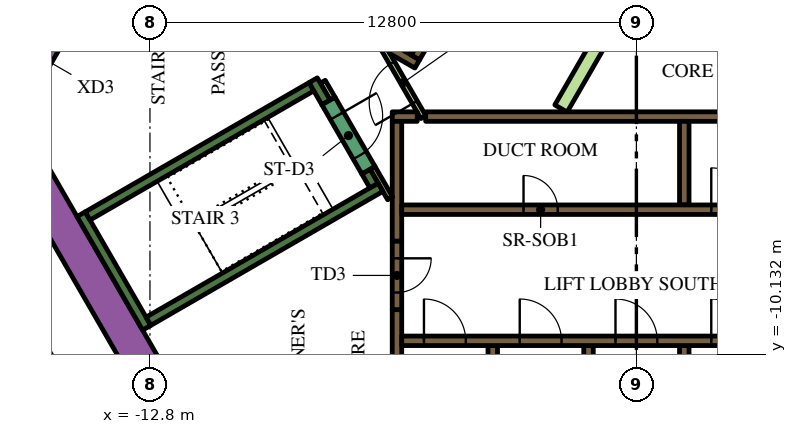
"""IFC4 building model, lengths in metres.
Left out: names, types, materials, properties, quantities, classifications, styles, units other than length and angle.
Written with IfcOpenShell. Run it as: python <this file> out.ifc"""

import sys

from ifc_helpers import new_model, si_unit, direction, frame, frame_2d, origin, place, context, subcontext, project, spatial, polyline, rectangle, outline, extrude, element, fill, save


model = new_model("IFC4")
c1 = context("Model", 3, precision=1e-05, world=origin(), true_north=direction((0.0, 1.0)))
c2 = subcontext(c1, "Body", "Model", "MODEL_VIEW")
j1 = project(units=[si_unit("LENGTHUNIT", "METRE"), si_unit("PLANEANGLEUNIT", "RADIAN")], contexts=[c1])
p1 = place(None, origin())
s1 = spatial("IfcSite", under=j1, at=p1, CompositionType="ELEMENT")
p2 = place(p1, origin())
s2 = spatial("IfcBuilding", under=s1, at=p2, CompositionType="ELEMENT")
p3 = place(p2, frame((0.0, 0.0, 39.3)))
s3 = spatial("IfcBuildingStorey", under=s2, at=p3, CompositionType="ELEMENT", Elevation=39.3)
p4 = place(p3, frame((-12.134, -11.883, 0.0), z_axis=(0.0, 0.0, 1.0), x_axis=(-0.500005339912, 0.866022320763, 0.0)))
e1 = element("IfcWall", 1, at=p4, inside=s3, PredefinedType="SOLIDWALL", context=c2, shape_type="SweptSolid", body=[
    extrude(rectangle(XDim=9.488, YDim=0.9, at=frame_2d((4.744, 0.0))), origin(), (0.0, 0.0, 1.0), 3.9),
])
p5 = place(p3, frame((-12.885, -9.431, 0.0), z_axis=(0.0, 0.0, 1.0), x_axis=(-0.500020560727, 0.866013532718, 0.0)))
e2 = element("IfcWall", 2, at=p5, inside=s3, PredefinedType="SOLIDWALL", context=c2, shape_type="SweptSolid", body=[
    extrude(rectangle(XDim=3.45, YDim=0.25, at=frame_2d((1.725, 0.0))), origin(), (0.0, 0.0, 1.0), 3.9),
])
p6 = place(p3, frame((-14.44, -6.49, 0.0), z_axis=(0.0, 0.0, 1.0), x_axis=(0.866022966069, 0.500004222222, 0.0)))
e3 = element("IfcWall", 3, at=p6, inside=s3, PredefinedType="SOLIDWALL", context=c2, shape_type="SweptSolid", body=[
    extrude(rectangle(XDim=6.8, YDim=0.25, at=frame_2d((3.4, 0.0))), origin(), (0.0, 0.0, 1.0), 3.9),
])
p7 = place(p3, frame((-8.168, -3.503, 0.0), z_axis=(0.0, 0.0, 1.0), x_axis=(-0.499952099219, 0.866053057547, 0.0)))
e4 = element("IfcWall", 4, at=p7, inside=s3, PredefinedType="SOLIDWALL", context=c2, shape_type="SweptSolid", body=[
    extrude(rectangle(XDim=0.675, YDim=0.25, at=frame_2d((0.337, 0.0))), origin(), (0.0, 0.0, 1.0), 3.9),
])
p8 = place(p3, frame((-12.84, -9.261, 0.0), z_axis=(0.0, 0.0, 1.0), x_axis=(0.866016039709, 0.500016218704, 0.0)))
e5 = element("IfcWall", 5, at=p8, inside=s3, PredefinedType="SOLIDWALL", context=c2, shape_type="SweptSolid", body=[
    extrude(rectangle(XDim=7.05, YDim=0.25, at=frame_2d((3.525, 0.0))), origin(), (0.0, 0.0, 1.0), 3.9),
])
p9 = place(p3, frame((-6.905, -5.69, 0.0), z_axis=(0.0, 0.0, 1.0), x_axis=(-0.500402024738, 0.865793170242, 0.0)))
e6 = element("IfcWall", 6, at=p9, inside=s3, PredefinedType="SOLIDWALL", context=c2, shape_type="SweptSolid", body=[
    extrude(rectangle(XDim=0.425, YDim=0.25, at=frame_2d((0.212, 0.0))), origin(), (0.0, 0.0, 1.0), 3.9),
])
p10 = place(p3, frame((-3.78, -12.1, 0.0), z_axis=(0.0, 0.0, 1.0), x_axis=(0.0, 1.0, 0.0)))
e7 = element("IfcWall", 7, at=p10, inside=s3, PredefinedType="SOLIDWALL", context=c2, shape_type="SweptSolid", body=[
    extrude(rectangle(XDim=2.2, YDim=0.25, at=frame_2d((1.1, 0.0))), origin(), (0.0, 0.0, 1.0), 3.9),
])
p11 = place(p3, frame((-6.3, -12.1, 0.0), z_axis=(0.0, 0.0, 1.0), x_axis=(0.0, 1.0, 0.0)))
e8 = element("IfcWall", 8, at=p11, inside=s3, PredefinedType="SOLIDWALL", context=c2, shape_type="SweptSolid", body=[
    extrude(rectangle(XDim=3.146, YDim=0.25, at=frame_2d((1.573, 0.0))), origin(), (0.0, 0.0, 1.0), 3.9),
])
p12 = place(p3, frame((-5.545, -3.875, 0.0), z_axis=(0.0, 0.0, 1.0), x_axis=(1.0, 0.0, 0.0)))
e9 = element("IfcWall", 9, at=p12, inside=s3, PredefinedType="SOLIDWALL", context=c2, shape_type="SweptSolid", body=[
    extrude(rectangle(XDim=11.97, YDim=0.25, at=frame_2d((5.985, 0.0))), origin(), (0.0, 0.0, 1.0), 3.9),
])
p13 = place(p3, frame((-6.425, -3.875, 0.0), z_axis=(0.0, 0.0, 1.0), x_axis=(1.0, 0.0, 0.0)))
e10 = element("IfcWall", 10, at=p13, inside=s3, PredefinedType="SOLIDWALL", context=c2, shape_type="SweptSolid", body=[
    extrude(rectangle(XDim=0.658, YDim=0.25, at=frame_2d((0.329, 0.0))), origin(), (0.0, 0.0, 1.0), 3.9),
])
p14 = place(p3, frame((1.26, -4.0, 0.0), z_axis=(0.0, 0.0, 1.0), x_axis=(0.0, -1.0, 0.0)))
e11 = element("IfcWall", 11, at=p14, inside=s3, PredefinedType="SOLIDWALL", context=c2, shape_type="SweptSolid", body=[
    extrude(rectangle(XDim=2.2, YDim=0.25, at=frame_2d((1.1, 0.0))), origin(), (0.0, 0.0, 1.0), 3.9),
])
p15 = place(p3, frame((-6.3, -4.0, 0.0), z_axis=(0.0, 0.0, 1.0), x_axis=(0.0, -1.0, 0.0)))
e12 = element("IfcWall", 12, at=p15, inside=s3, PredefinedType="SOLIDWALL", context=c2, shape_type="SweptSolid", body=[
    extrude(rectangle(XDim=3.154, YDim=0.25, at=frame_2d((1.577, 0.0))), origin(), (0.0, 0.0, 1.0), 3.9),
])
for number, where, z_axis, x_axis in (
    (13, (1.26, -12.1, 0.0), (0.0, 0.0, 1.0), (0.0, 1.0, 0.0)),
    (14, (-1.26, -12.1, 0.0), (0.0, 0.0, 1.0), (0.0, 1.0, 0.0)),
):
    element("IfcWall", number, at=place(p3, frame(where, z_axis=z_axis, x_axis=x_axis)), inside=s3, PredefinedType="SOLIDWALL", context=c2, shape_type="SweptSolid", body=[
        extrude(rectangle(XDim=2.2, YDim=0.25, at=frame_2d((1.1, 0.0))), origin(), (0.0, 0.0, 1.0), 3.9),
    ])
p16 = place(p3, origin())
e15 = element("IfcWall", 15, at=p16, inside=s3, PredefinedType="SOLIDWALL", context=c2, shape_type="SweptSolid", body=[
    extrude(outline(polyline([(0.566, 6.725), (0.566, 6.875), (0.566, 6.875), (0.565, 6.875), (0.361, 6.875), (0.035, 7.439), (0.252, 7.564), (0.377, 7.348), (6.552, -3.348), (6.677, -3.564), (6.46, -3.689), (0.448, 6.725), (0.565, 6.725), (0.566, 6.725), (0.566, 6.725)])), origin(), (0.0, 0.0, 1.0), 3.9),
])
e16 = element("IfcWall", 16, at=p16, inside=s3, PredefinedType="SOLIDWALL", context=c2, shape_type="SweptSolid", body=[
    extrude(outline(polyline([(-5.922, -2.257), (-5.922, -2.257), (-5.705, -2.382), (-5.83, -2.598), (-6.483, -2.221), (-6.591, -2.033), (-6.591, -2.033), (-6.7, -2.096), (-7.952, -1.373), (-7.827, -1.156), (-5.922, -2.257)])), origin(), (0.0, 0.0, 1.0), 3.9),
])
p17 = place(p3, frame((-6.48, -6.027, 0.0), z_axis=(0.0, 0.0, 1.0), x_axis=(-0.499927229454, 0.866067413802, 0.0)))
e17 = element("IfcWall", 17, at=p17, inside=s3, PredefinedType="PARTITIONING", context=c2, shape_type="SweptSolid", body=[
    extrude(rectangle(XDim=0.929, YDim=0.15, at=frame_2d((0.464, 0.0))), origin(), (0.0, 0.0, 1.0), 3.9),
])
p18 = place(p3, frame((-8.252, -2.958, 0.0), z_axis=(0.0, 0.0, 1.0), x_axis=(0.500174715838, -0.865924508047, 0.0)))
e18 = element("IfcWall", 18, at=p18, inside=s3, PredefinedType="PARTITIONING", context=c2, shape_type="SweptSolid", body=[
    extrude(rectangle(XDim=0.514, YDim=0.15, at=frame_2d((0.257, 0.0))), origin(), (0.0, 0.0, 1.0), 2.75),
])
e19 = element("IfcWall", 19, at=p16, inside=s3, PredefinedType="PARTITIONING", context=c2, shape_type="SweptSolid", body=[
    extrude(outline(polyline([(-0.59, -0.872), (-0.265, -1.059), (-1.822, -3.756), (-2.147, -3.568), (-0.59, -0.872)])), origin(), (0.0, 0.0, 1.0), 2.75),
])
p19 = place(p3, frame((-6.175, -9.775, 0.0), z_axis=(0.0, 0.0, 1.0), x_axis=(1.0, 0.0, 0.0)))
e20 = element("IfcWall", 20, at=p19, inside=s3, PredefinedType="SOLIDWALL", context=c2, shape_type="SweptSolid", body=[
    extrude(rectangle(XDim=12.35, YDim=0.25, at=frame_2d((6.175, 0.0))), origin(), (0.0, 0.0, 1.0), 3.9),
])
p20 = place(p19, frame((0.585, 0.0, 0.0)))
e21 = element("IfcOpeningElement", 21, at=p20, cuts=e20, PredefinedType="OPENING", context=c2, shape_type="SweptSolid", body=[
    extrude(rectangle(XDim=1.1, YDim=2.1, at=frame_2d((0.55, 1.05))), frame((0.0, 0.135, 0.0), z_axis=(0.0, -1.0, 0.0), x_axis=(1.0, 0.0, 0.0)), (0.0, 0.0, 1.0), 0.27),
])
p21 = place(p19, frame((3.105, 0.0, 0.0)))
e22 = element("IfcOpeningElement", 22, at=p21, cuts=e20, PredefinedType="OPENING", context=c2, shape_type="SweptSolid", body=[
    extrude(rectangle(XDim=1.1, YDim=2.1, at=frame_2d((0.55, 1.05))), frame((0.0, 0.135, 0.0), z_axis=(0.0, -1.0, 0.0), x_axis=(1.0, 0.0, 0.0)), (0.0, 0.0, 1.0), 0.27),
])
p22 = place(p19, frame((5.625, 0.0, 0.0)))
e23 = element("IfcOpeningElement", 23, at=p22, cuts=e20, PredefinedType="OPENING", context=c2, shape_type="SweptSolid", body=[
    extrude(rectangle(XDim=1.1, YDim=2.1, at=frame_2d((0.55, 1.05))), frame((0.0, 0.135, 0.0), z_axis=(0.0, -1.0, 0.0), x_axis=(1.0, 0.0, 0.0)), (0.0, 0.0, 1.0), 0.27),
])
p23 = place(p19, frame((8.145, 0.0, 0.0)))
e24 = element("IfcOpeningElement", 24, at=p23, cuts=e20, PredefinedType="OPENING", context=c2, shape_type="SweptSolid", body=[
    extrude(rectangle(XDim=1.1, YDim=2.1, at=frame_2d((0.55, 1.05))), frame((0.0, 0.135, 0.0), z_axis=(0.0, -1.0, 0.0), x_axis=(1.0, 0.0, 0.0)), (0.0, 0.0, 1.0), 0.27),
])
p24 = place(p19, frame((10.665, 0.0, 0.0)))
e25 = element("IfcOpeningElement", 25, at=p24, cuts=e20, PredefinedType="OPENING", context=c2, shape_type="SweptSolid", body=[
    extrude(rectangle(XDim=1.1, YDim=2.1, at=frame_2d((0.55, 1.05))), frame((0.0, 0.135, 0.0), z_axis=(0.0, -1.0, 0.0), x_axis=(1.0, 0.0, 0.0)), (0.0, 0.0, 1.0), 0.27),
])
p25 = place(p3, frame((-6.175, -6.325, 0.0), z_axis=(0.0, 0.0, 1.0), x_axis=(1.0, 0.0, 0.0)))
e26 = element("IfcWall", 26, at=p25, inside=s3, PredefinedType="SOLIDWALL", context=c2, shape_type="SweptSolid", body=[
    extrude(rectangle(XDim=12.35, YDim=0.25, at=frame_2d((6.175, 0.0))), origin(), (0.0, 0.0, 1.0), 3.9),
])
p26 = place(p25, frame((3.205, 0.0, 0.0)))
e27 = element("IfcOpeningElement", 27, at=p26, cuts=e26, PredefinedType="OPENING", context=c2, shape_type="SweptSolid", body=[
    extrude(rectangle(XDim=0.9, YDim=2.1, at=frame_2d((0.45, 1.05))), frame((0.0, 0.135, 0.0), z_axis=(0.0, -1.0, 0.0), x_axis=(1.0, 0.0, 0.0)), (0.0, 0.0, 1.0), 0.27),
])
p27 = place(p25, frame((8.145, 0.0, 0.0)))
e28 = element("IfcOpeningElement", 28, at=p27, cuts=e26, PredefinedType="OPENING", context=c2, shape_type="SweptSolid", body=[
    extrude(rectangle(XDim=1.1, YDim=2.1, at=frame_2d((0.55, 1.05))), frame((0.0, 0.135, 0.0), z_axis=(0.0, -1.0, 0.0), x_axis=(1.0, 0.0, 0.0)), (0.0, 0.0, 1.0), 0.27),
])
p28 = place(p25, frame((10.665, 0.0, 0.0)))
e29 = element("IfcOpeningElement", 29, at=p28, cuts=e26, PredefinedType="OPENING", context=c2, shape_type="SweptSolid", body=[
    extrude(rectangle(XDim=1.1, YDim=2.1, at=frame_2d((0.55, 1.05))), frame((0.0, 0.135, 0.0), z_axis=(0.0, -1.0, 0.0), x_axis=(1.0, 0.0, 0.0)), (0.0, 0.0, 1.0), 0.27),
])
p29 = place(p3, frame((-0.898, 6.194, 0.0), z_axis=(0.0, 0.0, 1.0), x_axis=(-0.499996202215, -0.866027596426, 0.0)))
e30 = element("IfcWall", 30, at=p29, inside=s3, PredefinedType="SOLIDWALL", context=c2, shape_type="SweptSolid", body=[
    extrude(rectangle(XDim=9.83, YDim=0.25, at=frame_2d((4.915, 0.0))), origin(), (0.0, 0.0, 1.0), 3.9),
])
p30 = place(p29, frame((0.585, 0.0, 0.0)))
e31 = element("IfcOpeningElement", 31, at=p30, cuts=e30, PredefinedType="OPENING", context=c2, shape_type="SweptSolid", body=[
    extrude(rectangle(XDim=1.1, YDim=2.1, at=frame_2d((0.55, 1.05))), frame((0.0, 0.135, 0.0), z_axis=(0.0, -1.0, 0.0), x_axis=(1.0, 0.0, 0.0)), (0.0, 0.0, 1.0), 0.27),
])
p31 = place(p29, frame((3.105, 0.0, 0.0)))
e32 = element("IfcOpeningElement", 32, at=p31, cuts=e30, PredefinedType="OPENING", context=c2, shape_type="SweptSolid", body=[
    extrude(rectangle(XDim=1.1, YDim=2.1, at=frame_2d((0.55, 1.05))), frame((0.0, 0.135, 0.0), z_axis=(0.0, -1.0, 0.0), x_axis=(1.0, 0.0, 0.0)), (0.0, 0.0, 1.0), 0.27),
])
p32 = place(p29, frame((5.625, 0.0, 0.0)))
e33 = element("IfcOpeningElement", 33, at=p32, cuts=e30, PredefinedType="OPENING", context=c2, shape_type="SweptSolid", body=[
    extrude(rectangle(XDim=1.1, YDim=2.1, at=frame_2d((0.55, 1.05))), frame((0.0, 0.135, 0.0), z_axis=(0.0, -1.0, 0.0), x_axis=(1.0, 0.0, 0.0)), (0.0, 0.0, 1.0), 0.27),
])
p33 = place(p29, frame((8.145, 0.0, 0.0)))
e34 = element("IfcOpeningElement", 34, at=p33, cuts=e30, PredefinedType="OPENING", context=c2, shape_type="SweptSolid", body=[
    extrude(rectangle(XDim=1.1, YDim=2.1, at=frame_2d((0.55, 1.05))), frame((0.0, 0.135, 0.0), z_axis=(0.0, -1.0, 0.0), x_axis=(1.0, 0.0, 0.0)), (0.0, 0.0, 1.0), 0.27),
])
p34 = place(p3, frame((-8.103, -3.466, 0.0), z_axis=(0.0, 0.0, 1.0), x_axis=(0.500078061341, -0.865980330357, 0.0)))
e35 = element("IfcWall", 35, at=p34, inside=s3, PredefinedType="SOLIDWALL", context=c2, shape_type="SweptSolid", body=[
    extrude(rectangle(XDim=2.1, YDim=0.4, at=frame_2d((1.05, 0.0))), origin(), (0.0, 0.0, 1.0), 3.9),
])
p35 = place(p34, frame((0.45, 0.0, 0.0)))
e36 = element("IfcOpeningElement", 36, at=p35, cuts=e35, PredefinedType="OPENING", context=c2, shape_type="SweptSolid", body=[
    extrude(rectangle(XDim=1.2, YDim=2.1, at=frame_2d((0.6, 1.05))), frame((0.0, 0.21, 0.0), z_axis=(0.0, -1.0, 0.0), x_axis=(1.0, 0.0, 0.0)), (0.0, 0.0, 1.0), 0.42),
])
p36 = place(p3, frame((-6.3, -7.154, 0.0), z_axis=(0.0, 0.0, 1.0), x_axis=(0.0, -1.0, 0.0)))
e37 = element("IfcWall", 37, at=p36, inside=s3, PredefinedType="SOLIDWALL", context=c2, shape_type="SweptSolid", body=[
    extrude(rectangle(XDim=1.8, YDim=0.25, at=frame_2d((0.9, 0.0))), origin(), (0.0, 0.0, 1.0), 3.9),
])
p37 = place(p36, frame((0.45, 0.0, 0.0)))
e38 = element("IfcOpeningElement", 38, at=p37, cuts=e37, PredefinedType="OPENING", context=c2, shape_type="SweptSolid", body=[
    extrude(rectangle(XDim=0.9, YDim=2.1, at=frame_2d((0.45, 1.05))), frame((0.0, 0.135, 0.0), z_axis=(0.0, -1.0, 0.0), x_axis=(1.0, 0.0, 0.0)), (0.0, 0.0, 1.0), 0.27),
])
p38 = place(p3, frame((-5.606, -3.89, 0.0), z_axis=(0.0, 0.0, 1.0), x_axis=(-0.500027713859, 0.866009402589, 0.0)))
e39 = element("IfcWall", 39, at=p38, inside=s3, PredefinedType="PARTITIONING", context=c2, shape_type="SweptSolid", body=[
    extrude(rectangle(XDim=2.1, YDim=0.15, at=frame_2d((1.05, 0.0))), origin(), (0.0, 0.0, 1.0), 2.75),
])
p39 = place(p38, frame((0.45, 0.0, 0.0)))
e40 = element("IfcOpeningElement", 40, at=p39, cuts=e39, PredefinedType="OPENING", context=c2, shape_type="SweptSolid", body=[
    extrude(rectangle(XDim=1.2, YDim=2.1, at=frame_2d((0.6, 1.05))), frame((0.0, 0.085, 0.0), z_axis=(0.0, -1.0, 0.0), x_axis=(1.0, 0.0, 0.0)), (0.0, 0.0, 1.0), 0.17),
])
p40 = place(p3, frame((-16.209, -2.976, 0.0), z_axis=(0.0, 0.0, 1.0), x_axis=(0.499954529098, 0.86605165483, 0.0)))
e41 = element("IfcWall", 41, at=p40, inside=s3, PredefinedType="SOLIDWALL", context=c2, shape_type="SweptSolid", body=[
    extrude(rectangle(XDim=1.7, YDim=0.9, at=frame_2d((0.85, 0.0))), origin(), (0.0, 0.0, 1.0), 3.9),
])
p41 = place(p40, frame((0.25, 0.0, 0.0)))
e42 = element("IfcOpeningElement", 42, at=p41, cuts=e41, PredefinedType="OPENING", context=c2, shape_type="SweptSolid", body=[
    extrude(rectangle(XDim=1.2, YDim=2.1, at=frame_2d((0.6, 1.05))), frame((0.0, 0.46, 0.0), z_axis=(0.0, -1.0, 0.0), x_axis=(1.0, 0.0, 0.0)), (0.0, 0.0, 1.0), 0.92),
])
p42 = place(p3, frame((-19.081, -3.9, 0.0), z_axis=(0.0, 0.0, 1.0), x_axis=(0.499998313975, 0.866026377209, 0.0)))
e43 = element("IfcWall", 43, at=p42, inside=s3, PredefinedType="PARTITIONING", context=c2, shape_type="SweptSolid", body=[
    extrude(rectangle(XDim=25.766, YDim=0.15, at=frame_2d((12.883, 0.0))), origin(), (0.0, 0.0, 1.0), 2.75),
])
p43 = place(p42, frame((16.196, 0.0, 0.0)))
e44 = element("IfcOpeningElement", 44, at=p43, cuts=e43, PredefinedType="OPENING", context=c2, shape_type="SweptSolid", body=[
    extrude(rectangle(XDim=1.0, YDim=2.1, at=frame_2d((0.5, 1.05))), frame((0.0, 0.085, 0.0), z_axis=(0.0, -1.0, 0.0), x_axis=(1.0, 0.0, 0.0)), (0.0, 0.0, 1.0), 0.17),
])
p44 = place(p42, frame((14.889, 0.0, 0.0)))
e45 = element("IfcOpeningElement", 45, at=p44, cuts=e43, PredefinedType="OPENING", context=c2, shape_type="SweptSolid", body=[
    extrude(rectangle(XDim=1.0, YDim=2.1, at=frame_2d((0.5, 1.05))), frame((0.0, 0.085, 0.0), z_axis=(0.0, -1.0, 0.0), x_axis=(1.0, 0.0, 0.0)), (0.0, 0.0, 1.0), 0.17),
])
p45 = place(p42, frame((3.698, 0.0, 0.0)))
e46 = element("IfcOpeningElement", 46, at=p45, cuts=e43, PredefinedType="OPENING", context=c2, shape_type="SweptSolid", body=[
    extrude(rectangle(XDim=1.1, YDim=2.1, at=frame_2d((0.55, 1.05))), frame((0.0, 0.085, 0.0), z_axis=(0.0, -1.0, 0.0), x_axis=(1.0, 0.0, 0.0)), (0.0, 0.0, 1.0), 0.17),
])
p46 = place(p42, frame((2.392, 0.0, 0.0)))
e47 = element("IfcOpeningElement", 47, at=p46, cuts=e43, PredefinedType="OPENING", context=c2, shape_type="SweptSolid", body=[
    extrude(rectangle(XDim=1.0, YDim=2.1, at=frame_2d((0.5, 1.05))), frame((0.0, 0.085, 0.0), z_axis=(0.0, -1.0, 0.0), x_axis=(1.0, 0.0, 0.0)), (0.0, 0.0, 1.0), 0.17),
])
p47 = place(p3, frame((-12.918, -14.575, 0.0), z_axis=(0.0, 0.0, 1.0), x_axis=(-0.500009150678, 0.866020120573, 0.0)))
e48 = element("IfcWall", 48, at=p47, inside=s3, PredefinedType="PARTITIONING", context=c2, shape_type="SweptSolid", body=[
    extrude(rectangle(XDim=5.258, YDim=0.15, at=frame_2d((2.629, 0.0))), origin(), (0.0, 0.0, 1.0), 2.75),
])
p48 = place(p47, frame((1.888, 0.0, 0.0)))
e49 = element("IfcOpeningElement", 49, at=p48, cuts=e48, PredefinedType="OPENING", context=c2, shape_type="SweptSolid", body=[
    extrude(rectangle(XDim=1.0, YDim=2.1, at=frame_2d((0.5, 1.05))), frame((0.0, 0.085, 0.0), z_axis=(0.0, -1.0, 0.0), x_axis=(1.0, 0.0, 0.0)), (0.0, 0.0, 1.0), 0.17),
])
p49 = place(p20, origin())
e50 = element("IfcDoor", 50, at=p49, inside=s3, OperationType="DOUBLE_DOOR_SLIDING", PredefinedType="DOOR", context=c2, shape_type="SweptSolid", body=[
    extrude(rectangle(XDim=1.1, YDim=2.1, at=frame_2d((0.55, 1.05))), frame((0.0, 0.025, 0.0), z_axis=(0.0, -1.0, 0.0), x_axis=(1.0, 0.0, 0.0)), (0.0, 0.0, 1.0), 0.05),
])
fill(e21, e50)
p50 = place(p21, origin())
e51 = element("IfcDoor", 51, at=p50, inside=s3, OperationType="DOUBLE_DOOR_SLIDING", PredefinedType="DOOR", context=c2, shape_type="SweptSolid", body=[
    extrude(rectangle(XDim=1.1, YDim=2.1, at=frame_2d((0.55, 1.05))), frame((0.0, 0.025, 0.0), z_axis=(0.0, -1.0, 0.0), x_axis=(1.0, 0.0, 0.0)), (0.0, 0.0, 1.0), 0.05),
])
fill(e22, e51)
p51 = place(p22, origin())
e52 = element("IfcDoor", 52, at=p51, inside=s3, OperationType="DOUBLE_DOOR_SLIDING", PredefinedType="DOOR", context=c2, shape_type="SweptSolid", body=[
    extrude(rectangle(XDim=1.1, YDim=2.1, at=frame_2d((0.55, 1.05))), frame((0.0, 0.025, 0.0), z_axis=(0.0, -1.0, 0.0), x_axis=(1.0, 0.0, 0.0)), (0.0, 0.0, 1.0), 0.05),
])
fill(e23, e52)
p52 = place(p23, origin())
e53 = element("IfcDoor", 53, at=p52, inside=s3, OperationType="DOUBLE_DOOR_SLIDING", PredefinedType="DOOR", context=c2, shape_type="SweptSolid", body=[
    extrude(rectangle(XDim=1.1, YDim=2.1, at=frame_2d((0.55, 1.05))), frame((0.0, 0.025, 0.0), z_axis=(0.0, -1.0, 0.0), x_axis=(1.0, 0.0, 0.0)), (0.0, 0.0, 1.0), 0.05),
])
fill(e24, e53)
p53 = place(p26, origin())
e54 = element("IfcDoor", 54, at=p53, inside=s3, OperationType="SINGLE_SWING_LEFT", PredefinedType="DOOR", context=c2, shape_type="SweptSolid", body=[
    extrude(rectangle(XDim=0.9, YDim=2.1, at=frame_2d((0.45, 1.05))), frame((0.0, 0.025, 0.0), z_axis=(0.0, -1.0, 0.0), x_axis=(1.0, 0.0, 0.0)), (0.0, 0.0, 1.0), 0.05),
])
fill(e27, e54)
p54 = place(p27, origin())
e55 = element("IfcDoor", 55, at=p54, inside=s3, OperationType="DOUBLE_DOOR_SLIDING", PredefinedType="DOOR", context=c2, shape_type="SweptSolid", body=[
    extrude(rectangle(XDim=1.1, YDim=2.1, at=frame_2d((0.55, 1.05))), frame((0.0, 0.025, 0.0), z_axis=(0.0, -1.0, 0.0), x_axis=(1.0, 0.0, 0.0)), (0.0, 0.0, 1.0), 0.05),
])
fill(e28, e55)
p55 = place(p35, origin())
e56 = element("IfcDoor", 56, at=p55, inside=s3, OperationType="SINGLE_SWING_LEFT", PredefinedType="DOOR", context=c2, shape_type="SweptSolid", body=[
    extrude(rectangle(XDim=1.2, YDim=2.1, at=frame_2d((0.6, 1.05))), frame((0.0, 0.025, 0.0), z_axis=(0.0, -1.0, 0.0), x_axis=(1.0, 0.0, 0.0)), (0.0, 0.0, 1.0), 0.05),
])
fill(e36, e56)
p56 = place(p37, origin())
e57 = element("IfcDoor", 57, at=p56, inside=s3, OperationType="SINGLE_SWING_LEFT", PredefinedType="DOOR", context=c2, shape_type="SweptSolid", body=[
    extrude(rectangle(XDim=0.9, YDim=2.1, at=frame_2d((0.45, 1.05))), frame((0.0, 0.025, 0.0), z_axis=(0.0, -1.0, 0.0), x_axis=(1.0, 0.0, 0.0)), (0.0, 0.0, 1.0), 0.05),
])
fill(e38, e57)
p57 = place(p39, origin())
e58 = element("IfcDoor", 58, at=p57, inside=s3, OperationType="SINGLE_SWING_LEFT", PredefinedType="DOOR", context=c2, shape_type="SweptSolid", body=[
    extrude(rectangle(XDim=1.2, YDim=2.1, at=frame_2d((0.6, 1.05))), frame((0.0, 0.025, 0.0), z_axis=(0.0, -1.0, 0.0), x_axis=(1.0, 0.0, 0.0)), (0.0, 0.0, 1.0), 0.05),
])
fill(e40, e58)
save(model, sys.argv[1])
